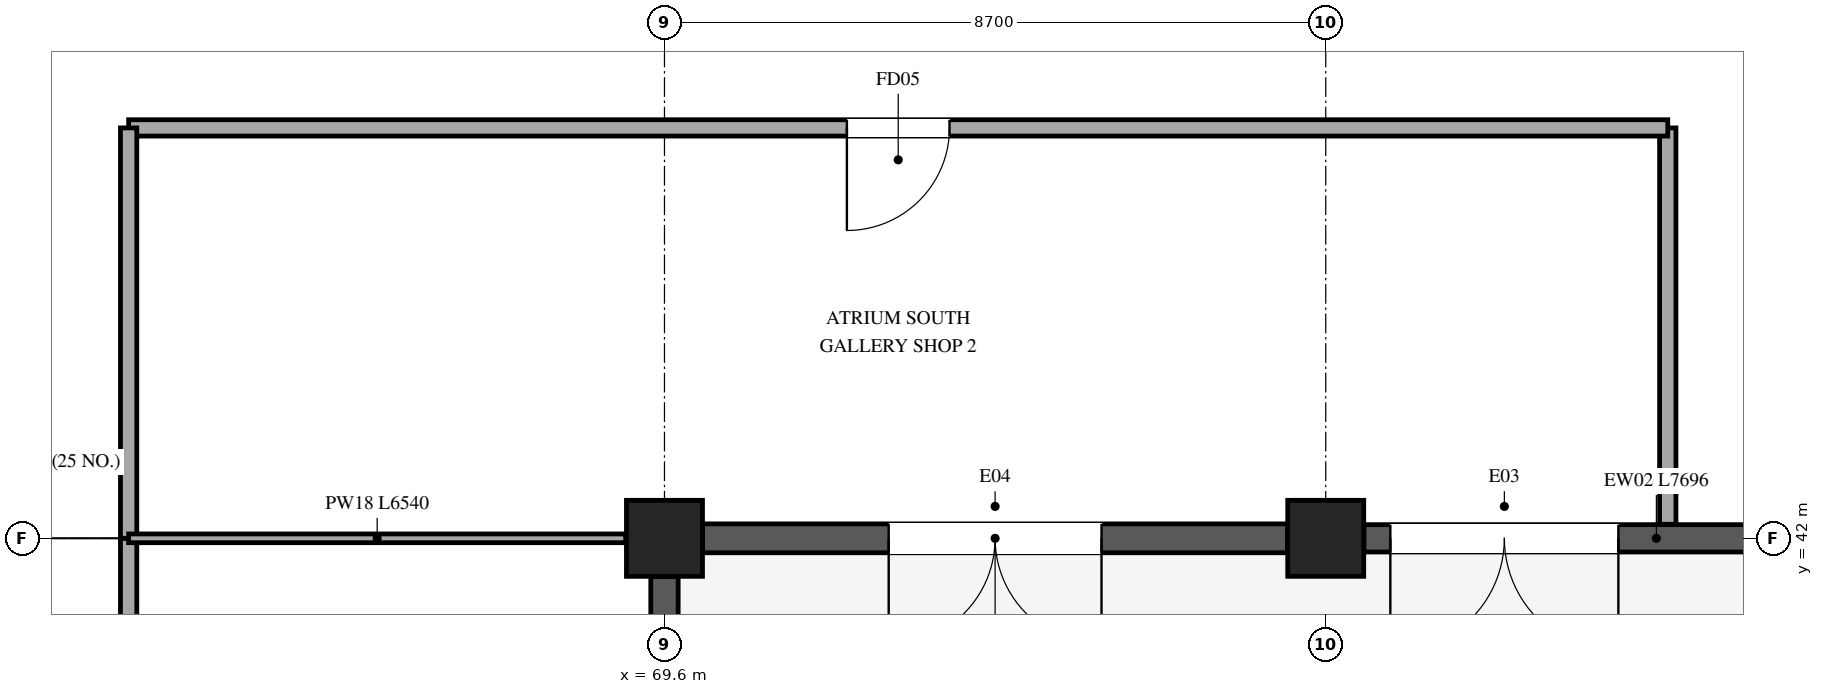
"""IFC4 building model, lengths in metres.
Left out: names, types, materials, properties, quantities, classifications, styles, units other than length and angle.
Written with IfcOpenShell. Run it as: python <this file> out.ifc"""

import sys

from ifc_helpers import new_model, si_unit, direction, frame, frame_2d, origin, origin_2d, place, context, subcontext, project, spatial, rectangle, extrude, element, fill, save


model = new_model("IFC4")
c1 = context("Model", 3, precision=1e-05, world=origin(), true_north=direction((0.0, 1.0)))
c2 = subcontext(c1, "Body", "Model", "MODEL_VIEW")
j1 = project(units=[si_unit("LENGTHUNIT", "METRE"), si_unit("PLANEANGLEUNIT", "RADIAN")], contexts=[c1])
p1 = place(None, origin())
s1 = spatial("IfcSite", under=j1, at=p1, CompositionType="ELEMENT")
p2 = place(p1, origin())
s2 = spatial("IfcBuilding", under=s1, at=p2, CompositionType="ELEMENT")
p3 = place(p2, origin())
s3 = spatial("IfcBuildingStorey", under=s2, at=p3, CompositionType="ELEMENT", Elevation=0.0)
for number, where, z_axis, x_axis in (
    (1, (69.6, 42.0, 0.0), (0.0, 0.0, 1.0), (1.0, 0.0, 0.0)),
    (2, (78.3, 42.0, 0.0), (0.0, 0.0, 1.0), (1.0, 0.0, 0.0)),
):
    element("IfcColumn", number, at=place(p3, frame(where, z_axis=z_axis, x_axis=x_axis)), inside=s3, PredefinedType="COLUMN", context=c2, shape_type="SweptSolid", body=[
        extrude(rectangle(XDim=1.0, YDim=1.0, at=origin_2d()), origin(), (0.0, 0.0, 1.0), 6.0),
    ])
p4 = place(p3, frame((86.498, 42.0, 0.0), z_axis=(0.0, 0.0, 1.0), x_axis=(-1.0, 0.0, 0.0)))
e3 = element("IfcWall", 3, at=p4, inside=s3, PredefinedType="STANDARD", context=c2, shape_type="SweptSolid", body=[
    extrude(rectangle(XDim=7.696, YDim=0.36, at=frame_2d((3.848, 0.0))), origin(), (0.0, 0.0, 1.0), 5.66),
])
p5 = place(p4, frame((4.348, 0.0, 0.0)))
e4 = element("IfcOpeningElement", 4, at=p5, cuts=e3, PredefinedType="OPENING", context=c2, shape_type="SweptSolid", body=[
    extrude(rectangle(XDim=3.0, YDim=2.6, at=frame_2d((1.5, 1.3))), frame((0.0, 0.19, 0.0), z_axis=(0.0, -1.0, 0.0), x_axis=(1.0, 0.0, 0.0)), (0.0, 0.0, 1.0), 0.38),
])
p6 = place(p3, frame((77.798, 42.0, 0.0), z_axis=(0.0, 0.0, 1.0), x_axis=(-1.0, 0.0, 0.0)))
e5 = element("IfcWall", 5, at=p6, inside=s3, PredefinedType="STANDARD", context=c2, shape_type="SweptSolid", body=[
    extrude(rectangle(XDim=7.696, YDim=0.38, at=frame_2d((3.848, 0.0))), origin(), (0.0, 0.0, 1.0), 5.66),
])
p7 = place(p6, frame((2.448, 0.0, 0.0)))
e6 = element("IfcOpeningElement", 6, at=p7, cuts=e5, PredefinedType="OPENING", context=c2, shape_type="SweptSolid", body=[
    extrude(rectangle(XDim=2.8, YDim=2.5, at=frame_2d((1.4, 1.25))), frame((0.0, 0.2, 0.0), z_axis=(0.0, -1.0, 0.0), x_axis=(1.0, 0.0, 0.0)), (0.0, 0.0, 1.0), 0.4),
])
p8 = place(p3, frame((69.6, 41.498, 0.0), z_axis=(0.0, 0.0, 1.0), x_axis=(0.0, -1.0, 0.0)))
e7 = element("IfcWall", 7, at=p8, inside=s3, PredefinedType="STANDARD", context=c2, shape_type="SweptSolid", body=[
    extrude(rectangle(XDim=7.396, YDim=0.36, at=frame_2d((3.698, 0.0))), origin(), (0.0, 0.0, 1.0), 5.66),
])
p9 = place(p3, frame((62.55, 42.0, 0.0), z_axis=(0.0, 0.0, 1.0), x_axis=(0.0, -1.0, 0.0)))
e8 = element("IfcWall", 8, at=p9, inside=s3, PredefinedType="PARTITIONING", context=c2, shape_type="SweptSolid", body=[
    extrude(rectangle(XDim=4.0, YDim=0.215, at=frame_2d((2.0, 0.0))), origin(), (0.0, 0.0, 1.0), 4.91),
])
p10 = place(p9, frame((1.325, 0.0, 0.0)))
e9 = element("IfcOpeningElement", 9, at=p10, cuts=e8, PredefinedType="OPENING", context=c2, shape_type="SweptSolid", body=[
    extrude(rectangle(XDim=1.35, YDim=2.2, at=frame_2d((0.675, 1.1))), frame((0.0, 0.118, 0.0), z_axis=(0.0, -1.0, 0.0), x_axis=(1.0, 0.0, 0.0)), (0.0, 0.0, 1.0), 0.235),
])
p11 = place(p3, frame((82.8, 42.185, 0.0), z_axis=(0.0, 0.0, 1.0), x_axis=(0.0, 1.0, 0.0)))
e10 = element("IfcWall", 10, at=p11, inside=s3, PredefinedType="PARTITIONING", context=c2, shape_type="SweptSolid", body=[
    extrude(rectangle(XDim=5.215, YDim=0.215, at=frame_2d((2.607, 0.0))), origin(), (0.0, 0.0, 1.0), 5.06),
])
p12 = place(p3, frame((82.8, 47.4, 0.0), z_axis=(0.0, 0.0, 1.0), x_axis=(-1.0, 0.0, 0.0)))
e11 = element("IfcWall", 11, at=p12, inside=s3, PredefinedType="PARTITIONING", context=c2, shape_type="SweptSolid", body=[
    extrude(rectangle(XDim=20.25, YDim=0.215, at=frame_2d((10.125, 0.0))), origin(), (0.0, 0.0, 1.0), 4.91),
])
p13 = place(p12, frame((9.45, 0.0, 0.0)))
e12 = element("IfcOpeningElement", 12, at=p13, cuts=e11, PredefinedType="OPENING", context=c2, shape_type="SweptSolid", body=[
    extrude(rectangle(XDim=1.35, YDim=2.2, at=frame_2d((0.675, 1.1))), frame((0.0, 0.118, 0.0), z_axis=(0.0, -1.0, 0.0), x_axis=(1.0, 0.0, 0.0)), (0.0, 0.0, 1.0), 0.235),
])
p14 = place(p3, frame((62.55, 47.4, 0.0), z_axis=(0.0, 0.0, 1.0), x_axis=(0.0, -1.0, 0.0)))
e13 = element("IfcWall", 13, at=p14, inside=s3, PredefinedType="PARTITIONING", context=c2, shape_type="SweptSolid", body=[
    extrude(rectangle(XDim=5.4, YDim=0.215, at=frame_2d((2.7, 0.0))), origin(), (0.0, 0.0, 1.0), 4.91),
])
p15 = place(p3, frame((62.55, 42.0, 0.0), z_axis=(0.0, 0.0, 1.0), x_axis=(1.0, 0.0, 0.0)))
e14 = element("IfcWall", 14, at=p15, inside=s3, PredefinedType="PARTITIONING", context=c2, shape_type="SweptSolid", body=[
    extrude(rectangle(XDim=6.54, YDim=0.115, at=frame_2d((3.27, 0.0))), origin(), (0.0, 0.0, 1.0), 4.91),
])
p16 = place(p5, origin())
e15 = element("IfcDoor", 15, at=p16, inside=s3, OperationType="DOUBLE_DOOR_SINGLE_SWING", PredefinedType="DOOR", context=c2, shape_type="SweptSolid", body=[
    extrude(rectangle(XDim=3.0, YDim=2.6, at=frame_2d((1.5, 1.3))), frame((0.0, 0.025, 0.0), z_axis=(0.0, -1.0, 0.0), x_axis=(1.0, 0.0, 0.0)), (0.0, 0.0, 1.0), 0.05),
])
fill(e4, e15)
p17 = place(p7, origin())
e16 = element("IfcDoor", 16, at=p17, inside=s3, OperationType="DOUBLE_DOOR_SINGLE_SWING", PredefinedType="DOOR", context=c2, shape_type="SweptSolid", body=[
    extrude(rectangle(XDim=2.8, YDim=2.5, at=frame_2d((1.4, 1.25))), frame((0.0, 0.025, 0.0), z_axis=(0.0, -1.0, 0.0), x_axis=(1.0, 0.0, 0.0)), (0.0, 0.0, 1.0), 0.05),
])
fill(e6, e16)
p18 = place(p13, origin())
e17 = element("IfcDoor", 17, at=p18, inside=s3, OperationType="SINGLE_SWING_RIGHT", PredefinedType="DOOR", context=c2, shape_type="SweptSolid", body=[
    extrude(rectangle(XDim=1.35, YDim=2.2, at=frame_2d((0.675, 1.1))), frame((0.0, 0.025, 0.0), z_axis=(0.0, -1.0, 0.0), x_axis=(1.0, 0.0, 0.0)), (0.0, 0.0, 1.0), 0.05),
])
fill(e12, e17)
save(model, sys.argv[1])
